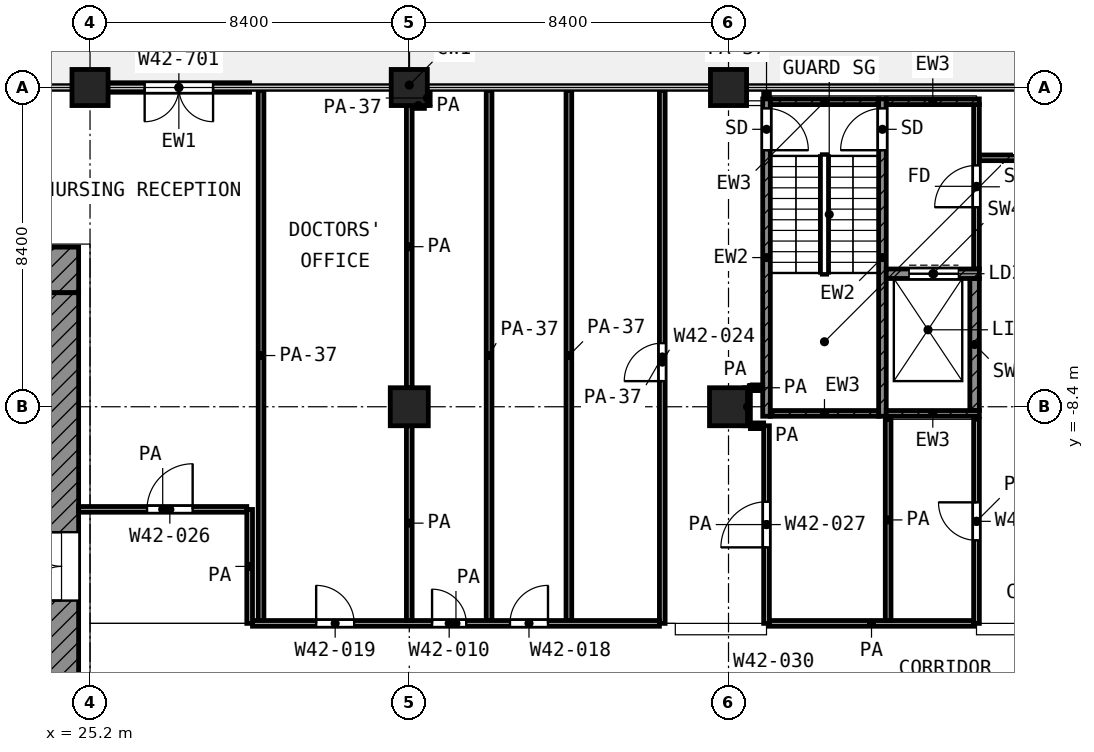
"""IFC4 building model, lengths in metres.
Left out: names, types, materials, properties, quantities, classifications, styles, units other than length and angle.
Written with IfcOpenShell. Run it as: python <this file> out.ifc"""

import sys

from ifc_helpers import new_model, si_unit, direction, frame, frame_2d, origin, origin_2d, place, context, subcontext, project, spatial, rectangle, extrude, element, fill, save


model = new_model("IFC4")
c1 = context("Model", 3, precision=1e-05, world=origin(), true_north=direction((0.0, 1.0)))
c2 = subcontext(c1, "Body", "Model", "MODEL_VIEW")
j1 = project(units=[si_unit("LENGTHUNIT", "METRE"), si_unit("PLANEANGLEUNIT", "RADIAN")], contexts=[c1])
p1 = place(None, origin())
s1 = spatial("IfcSite", under=j1, at=p1, CompositionType="ELEMENT")
p2 = place(p1, origin())
s2 = spatial("IfcBuilding", under=s1, at=p2, CompositionType="ELEMENT")
p3 = place(p2, frame((0.0, 0.0, 204.6)))
s3 = spatial("IfcBuildingStorey", under=s2, at=p3, CompositionType="ELEMENT", Elevation=204.6)
for number, where, z_axis, x_axis in (
    (1, (25.2, 0.0, 0.0), (0.0, 0.0, 1.0), (1.0, 0.0, 0.0)),
    (2, (33.6, 0.0, 0.0), (0.0, 0.0, 1.0), (1.0, 0.0, 0.0)),
    (3, (42.0, 0.0, 0.0), (0.0, 0.0, 1.0), (1.0, 0.0, 0.0)),
):
    element("IfcColumn", number, at=place(p3, frame(where, z_axis=z_axis, x_axis=x_axis)), inside=s3, PredefinedType="COLUMN", context=c2, shape_type="SweptSolid", body=[
        extrude(rectangle(XDim=0.95, YDim=0.95, at=origin_2d()), origin(), (0.0, 0.0, 1.0), 4.2),
    ])
for number, where, z_axis, x_axis in (
    (4, (33.6, -8.4, 0.0), (0.0, 0.0, 1.0), (1.0, 0.0, 0.0)),
    (5, (42.0, -8.4, 0.0), (0.0, 0.0, 1.0), (1.0, 0.0, 0.0)),
):
    element("IfcColumn", number, at=place(p3, frame(where, z_axis=z_axis, x_axis=x_axis)), inside=s3, PredefinedType="COLUMN", context=c2, shape_type="SweptSolid", body=[
        extrude(rectangle(XDim=1.0, YDim=1.0, at=origin_2d()), origin(), (0.0, 0.0, 1.0), 4.2),
    ])
p4 = place(p3, frame((29.4, 0.0, 0.0), z_axis=(0.0, 0.0, 1.0), x_axis=(-1.0, 0.0, 0.0)))
e6 = element("IfcWall", 6, at=p4, inside=s3, PredefinedType="SOLIDWALL", context=c2, shape_type="SweptSolid", body=[
    extrude(rectangle(XDim=3.725, YDim=0.25, at=frame_2d((1.862, 0.0))), origin(), (0.0, 0.0, 1.0), 2.58),
])
p5 = place(p4, frame((0.962, 0.0, 0.0)))
e7 = element("IfcOpeningElement", 7, at=p5, cuts=e6, PredefinedType="OPENING", context=c2, shape_type="SweptSolid", body=[
    extrude(rectangle(XDim=1.8, YDim=2.1, at=frame_2d((0.9, 1.05))), frame((0.0, 0.135, 0.0), z_axis=(0.0, -1.0, 0.0), x_axis=(1.0, 0.0, 0.0)), (0.0, 0.0, 1.0), 0.27),
])
p6 = place(p3, frame((4.2, -4.8, 0.0), z_axis=(0.0, 0.0, 1.0), x_axis=(1.0, 0.0, 0.0)))
e8 = element("IfcWall", 8, at=p6, inside=s3, PredefinedType="SHEAR", context=c2, shape_type="SweptSolid", body=[
    extrude(rectangle(XDim=20.7, YDim=1.2, at=frame_2d((10.35, 0.0))), origin(), (0.0, 0.0, 1.0), 3.6),
])
p7 = place(p6, frame((1.95, 0.0, 0.0)))
e9 = element("IfcOpeningElement", 9, at=p7, cuts=e8, PredefinedType="OPENING", context=c2, shape_type="SweptSolid", body=[
    extrude(rectangle(XDim=1.1, YDim=2.1, at=frame_2d((0.55, 1.05))), frame((0.0, 0.61, 0.0), z_axis=(0.0, -1.0, 0.0), x_axis=(1.0, 0.0, 0.0)), (0.0, 0.0, 1.0), 1.22),
])
p8 = place(p6, frame((17.95, 0.0, 0.0)))
e10 = element("IfcOpeningElement", 10, at=p8, cuts=e8, PredefinedType="OPENING", context=c2, shape_type="SweptSolid", body=[
    extrude(rectangle(XDim=1.1, YDim=2.1, at=frame_2d((0.55, 1.05))), frame((0.0, 0.61, 0.0), z_axis=(0.0, -1.0, 0.0), x_axis=(1.0, 0.0, 0.0)), (0.0, 0.0, 1.0), 1.22),
])
p9 = place(p3, frame((24.45, -24.0, 0.0), z_axis=(0.0, 0.0, 1.0), x_axis=(0.0, 1.0, 0.0)))
e11 = element("IfcWall", 11, at=p9, inside=s3, PredefinedType="SHEAR", context=c2, shape_type="SweptSolid", body=[
    extrude(rectangle(XDim=18.6, YDim=0.9, at=frame_2d((9.3, 0.0))), origin(), (0.0, 0.0, 1.0), 3.6),
])
p10 = place(p9, frame((10.5, 0.0, 0.0)))
e12 = element("IfcOpeningElement", 12, at=p10, cuts=e11, PredefinedType="OPENING", context=c2, shape_type="SweptSolid", body=[
    extrude(rectangle(XDim=1.8, YDim=2.1, at=frame_2d((0.9, 1.05))), frame((0.0, 0.46, 0.0), z_axis=(0.0, -1.0, 0.0), x_axis=(1.0, 0.0, 0.0)), (0.0, 0.0, 1.0), 0.92),
])
p11 = place(p3, frame((43.0, -8.65, 0.0), z_axis=(0.0, 0.0, 1.0), x_axis=(0.0, 1.0, 0.0)))
e13 = element("IfcWall", 13, at=p11, inside=s3, PredefinedType="SHEAR", context=c2, shape_type="SweptSolid", body=[
    extrude(rectangle(XDim=8.35, YDim=0.2, at=frame_2d((4.175, 0.0))), origin(), (0.0, 0.0, 1.0), 3.6),
])
p12 = place(p11, frame((7.0, 0.0, 0.0)))
e14 = element("IfcOpeningElement", 14, at=p12, cuts=e13, PredefinedType="OPENING", context=c2, shape_type="SweptSolid", body=[
    extrude(rectangle(XDim=1.1, YDim=2.1, at=frame_2d((0.55, 1.05))), frame((0.0, 0.11, 0.0), z_axis=(0.0, -1.0, 0.0), x_axis=(1.0, 0.0, 0.0)), (0.0, 0.0, 1.0), 0.22),
])
p13 = place(p3, frame((46.05, -8.65, 0.0), z_axis=(0.0, 0.0, 1.0), x_axis=(0.0, 1.0, 0.0)))
e15 = element("IfcWall", 15, at=p13, inside=s3, PredefinedType="SHEAR", context=c2, shape_type="SweptSolid", body=[
    extrude(rectangle(XDim=8.35, YDim=0.2, at=frame_2d((4.175, 0.0))), origin(), (0.0, 0.0, 1.0), 3.6),
])
p14 = place(p13, frame((7.0, 0.0, 0.0)))
e16 = element("IfcOpeningElement", 16, at=p14, cuts=e15, PredefinedType="OPENING", context=c2, shape_type="SweptSolid", body=[
    extrude(rectangle(XDim=1.1, YDim=2.1, at=frame_2d((0.55, 1.05))), frame((0.0, 0.11, 0.0), z_axis=(0.0, -1.0, 0.0), x_axis=(1.0, 0.0, 0.0)), (0.0, 0.0, 1.0), 0.22),
])
p15 = place(p3, frame((43.1, -0.375, 0.0), z_axis=(0.0, 0.0, 1.0), x_axis=(1.0, 0.0, 0.0)))
e17 = element("IfcWall", 17, at=p15, inside=s3, PredefinedType="SHEAR", context=c2, shape_type="SweptSolid", body=[
    extrude(rectangle(XDim=2.85, YDim=0.15, at=frame_2d((1.425, 0.0))), origin(), (0.0, 0.0, 1.0), 3.6),
])
p16 = place(p3, frame((46.15, -0.375, 0.0), z_axis=(0.0, 0.0, 1.0), x_axis=(1.0, 0.0, 0.0)))
e18 = element("IfcWall", 18, at=p16, inside=s3, PredefinedType="SHEAR", context=c2, shape_type="SweptSolid", body=[
    extrude(rectangle(XDim=2.45, YDim=0.15, at=frame_2d((1.225, 0.0))), origin(), (0.0, 0.0, 1.0), 3.6),
])
p17 = place(p3, frame((43.1, -8.575, 0.0), z_axis=(0.0, 0.0, 1.0), x_axis=(1.0, 0.0, 0.0)))
e19 = element("IfcWall", 19, at=p17, inside=s3, PredefinedType="SHEAR", context=c2, shape_type="SweptSolid", body=[
    extrude(rectangle(XDim=2.85, YDim=0.15, at=frame_2d((1.425, 0.0))), origin(), (0.0, 0.0, 1.0), 3.6),
])
p18 = place(p3, frame((46.15, -8.575, 0.0), z_axis=(0.0, 0.0, 1.0), x_axis=(1.0, 0.0, 0.0)))
e20 = element("IfcWall", 20, at=p18, inside=s3, PredefinedType="SHEAR", context=c2, shape_type="SweptSolid", body=[
    extrude(rectangle(XDim=2.45, YDim=0.15, at=frame_2d((1.225, 0.0))), origin(), (0.0, 0.0, 1.0), 3.6),
])
p19 = place(p3, frame((46.15, -4.9, 0.0), z_axis=(0.0, 0.0, 1.0), x_axis=(1.0, 0.0, 0.0)))
e21 = element("IfcWall", 21, at=p19, inside=s3, PredefinedType="SHEAR", context=c2, shape_type="SweptSolid", body=[
    extrude(rectangle(XDim=2.45, YDim=0.25, at=frame_2d((1.225, 0.0))), origin(), (0.0, 0.0, 1.0), 3.6),
])
p20 = place(p19, frame((0.6, 0.0, 0.0)))
e22 = element("IfcOpeningElement", 22, at=p20, cuts=e21, PredefinedType="OPENING", context=c2, shape_type="SweptSolid", body=[
    extrude(rectangle(XDim=1.3, YDim=2.1, at=frame_2d((0.65, 1.05))), frame((0.0, 0.135, 0.0), z_axis=(0.0, -1.0, 0.0), x_axis=(1.0, 0.0, 0.0)), (0.0, 0.0, 1.0), 0.27),
])
p21 = place(p3, frame((48.475, -8.5, 0.0), z_axis=(0.0, 0.0, 1.0), x_axis=(0.0, 1.0, 0.0)))
e23 = element("IfcWall", 23, at=p21, inside=s3, PredefinedType="SHEAR", context=c2, shape_type="SweptSolid", body=[
    extrude(rectangle(XDim=3.475, YDim=0.25, at=frame_2d((1.738, 0.0))), origin(), (0.0, 0.0, 1.0), 3.6),
])
p22 = place(p3, frame((48.525, -4.775, 0.0), z_axis=(0.0, 0.0, 1.0), x_axis=(0.0, 1.0, 0.0)))
e24 = element("IfcWall", 24, at=p22, inside=s3, PredefinedType="PARTITIONING", context=c2, shape_type="SweptSolid", body=[
    extrude(rectangle(XDim=4.325, YDim=0.15, at=frame_2d((2.163, 0.0))), origin(), (0.0, 0.0, 1.0), 3.6),
])
p23 = place(p22, frame((1.625, 0.0, 0.0)))
e25 = element("IfcOpeningElement", 25, at=p23, cuts=e24, PredefinedType="OPENING", context=c2, shape_type="SweptSolid", body=[
    extrude(rectangle(XDim=1.1, YDim=2.1, at=frame_2d((0.55, 1.05))), frame((0.0, 0.085, 0.0), z_axis=(0.0, -1.0, 0.0), x_axis=(1.0, 0.0, 0.0)), (0.0, 0.0, 1.0), 0.17),
])
p24 = place(p3, frame((29.475, -14.1, 0.0), z_axis=(0.0, 0.0, 1.0), x_axis=(1.0, 0.0, 0.0)))
e26 = element("IfcWall", 26, at=p24, inside=s3, PredefinedType="PARTITIONING", context=c2, shape_type="SweptSolid", body=[
    extrude(rectangle(XDim=10.707, YDim=0.15, at=frame_2d((5.354, 0.0))), origin(), (0.0, 0.0, 1.0), 3.6),
])
p25 = place(p24, frame((1.675, 0.0, 0.0)))
e27 = element("IfcOpeningElement", 27, at=p25, cuts=e26, PredefinedType="OPENING", context=c2, shape_type="SweptSolid", body=[
    extrude(rectangle(XDim=1.0, YDim=2.1, at=frame_2d((0.5, 1.05))), frame((0.0, 0.085, 0.0), z_axis=(0.0, -1.0, 0.0), x_axis=(1.0, 0.0, 0.0)), (0.0, 0.0, 1.0), 0.17),
])
p26 = place(p24, frame((4.725, 0.0, 0.0)))
e28 = element("IfcOpeningElement", 28, at=p26, cuts=e26, PredefinedType="OPENING", context=c2, shape_type="SweptSolid", body=[
    extrude(rectangle(XDim=0.9, YDim=2.1, at=frame_2d((0.45, 1.05))), frame((0.0, 0.085, 0.0), z_axis=(0.0, -1.0, 0.0), x_axis=(1.0, 0.0, 0.0)), (0.0, 0.0, 1.0), 0.17),
])
p27 = place(p24, frame((6.775, 0.0, 0.0)))
e29 = element("IfcOpeningElement", 29, at=p27, cuts=e26, PredefinedType="OPENING", context=c2, shape_type="SweptSolid", body=[
    extrude(rectangle(XDim=1.0, YDim=2.1, at=frame_2d((0.5, 1.05))), frame((0.0, 0.085, 0.0), z_axis=(0.0, -1.0, 0.0), x_axis=(1.0, 0.0, 0.0)), (0.0, 0.0, 1.0), 0.17),
])
p28 = place(p3, frame((43.075, -14.1, 0.0), z_axis=(0.0, 0.0, 1.0), x_axis=(1.0, 0.0, 0.0)))
e30 = element("IfcWall", 30, at=p28, inside=s3, PredefinedType="PARTITIONING", context=c2, shape_type="SweptSolid", body=[
    extrude(rectangle(XDim=5.375, YDim=0.15, at=frame_2d((2.688, 0.0))), origin(), (0.0, 0.0, 1.0), 3.6),
])
p29 = place(p3, frame((24.9, -11.1, 0.0), z_axis=(0.0, 0.0, 1.0), x_axis=(1.0, 0.0, 0.0)))
e31 = element("IfcWall", 31, at=p29, inside=s3, PredefinedType="PARTITIONING", context=c2, shape_type="SweptSolid", body=[
    extrude(rectangle(XDim=4.424, YDim=0.15, at=frame_2d((2.212, 0.0))), origin(), (0.0, 0.0, 1.0), 3.6),
])
p30 = place(p29, frame((1.8, 0.0, 0.0)))
e32 = element("IfcOpeningElement", 32, at=p30, cuts=e31, PredefinedType="OPENING", context=c2, shape_type="SweptSolid", body=[
    extrude(rectangle(XDim=1.2, YDim=2.1, at=frame_2d((0.6, 1.05))), frame((0.0, 0.085, 0.0), z_axis=(0.0, -1.0, 0.0), x_axis=(1.0, 0.0, 0.0)), (0.0, 0.0, 1.0), 0.17),
])
p31 = place(p3, frame((42.577, -8.9, 0.0), z_axis=(0.0, 0.0, 1.0), x_axis=(1.0, 0.0, 0.0)))
e33 = element("IfcWall", 33, at=p31, inside=s3, PredefinedType="PARTITIONING", context=c2, shape_type="SweptSolid", body=[
    extrude(rectangle(XDim=0.348, YDim=0.15, at=frame_2d((0.174, 0.0))), origin(), (0.0, 0.0, 1.0), 3.6),
])
p32 = place(p3, frame((42.577, -7.9, 0.0), z_axis=(0.0, 0.0, 1.0), x_axis=(1.0, 0.0, 0.0)))
e34 = element("IfcWall", 34, at=p32, inside=s3, PredefinedType="PARTITIONING", context=c2, shape_type="SweptSolid", body=[
    extrude(rectangle(XDim=0.323, YDim=0.15, at=frame_2d((0.162, 0.0))), origin(), (0.0, 0.0, 1.0), 3.6),
])
p33 = place(p3, frame((48.6, -1.85, 0.0), z_axis=(0.0, 0.0, 1.0), x_axis=(1.0, 0.0, 0.0)))
e35 = element("IfcWall", 35, at=p33, inside=s3, PredefinedType="PARTITIONING", context=c2, shape_type="SweptSolid", body=[
    extrude(rectangle(XDim=3.466, YDim=0.15, at=frame_2d((1.733, 0.0))), origin(), (0.0, 0.0, 1.0), 3.6),
])
p34 = place(p3, frame((33.677, -0.475, 0.0), z_axis=(0.0, 0.0, 1.0), x_axis=(1.0, 0.0, 0.0)))
e36 = element("IfcWall", 36, at=p34, inside=s3, PredefinedType="PARTITIONING", context=c2, shape_type="SweptSolid", body=[
    extrude(rectangle(XDim=0.321, YDim=0.15, at=frame_2d((0.161, 0.0))), origin(), (0.0, 0.0, 1.0), 3.6),
])
p35 = place(p3, frame((29.4, -14.1, 0.0), z_axis=(0.0, 0.0, 1.0), x_axis=(0.0, 1.0, 0.0)))
e37 = element("IfcWall", 37, at=p35, inside=s3, PredefinedType="PARTITIONING", context=c2, shape_type="SweptSolid", body=[
    extrude(rectangle(XDim=2.998, YDim=0.15, at=frame_2d((1.499, 0.0))), origin(), (0.0, 0.0, 1.0), 3.6),
])
p36 = place(p3, frame((29.7, -14.025, 0.0), z_axis=(0.0, 0.0, 1.0), x_axis=(0.0, 1.0, 0.0)))
e38 = element("IfcWall", 38, at=p36, inside=s3, PredefinedType="PARTITIONING", context=c2, shape_type="SweptSolid", body=[
    extrude(rectangle(XDim=13.945, YDim=0.15, at=frame_2d((6.972, 0.0))), origin(), (0.0, 0.0, 1.0), 2.7),
])
p37 = place(p3, frame((33.6, -14.025, 0.0), z_axis=(0.0, 0.0, 1.0), x_axis=(0.0, 1.0, 0.0)))
e39 = element("IfcWall", 39, at=p37, inside=s3, PredefinedType="PARTITIONING", context=c2, shape_type="SweptSolid", body=[
    extrude(rectangle(XDim=5.125, YDim=0.15, at=frame_2d((2.562, 0.0))), origin(), (0.0, 0.0, 1.0), 3.6),
])
p38 = place(p3, frame((33.6, -7.9, 0.0), z_axis=(0.0, 0.0, 1.0), x_axis=(0.0, 1.0, 0.0)))
e40 = element("IfcWall", 40, at=p38, inside=s3, PredefinedType="PARTITIONING", context=c2, shape_type="SweptSolid", body=[
    extrude(rectangle(XDim=7.423, YDim=0.15, at=frame_2d((3.711, 0.0))), origin(), (0.0, 0.0, 1.0), 3.6),
])
p39 = place(p3, frame((34.075, -0.473, 0.0), z_axis=(0.0, 0.0, 1.0), x_axis=(0.0, 1.0, 0.0)))
e41 = element("IfcWall", 41, at=p39, inside=s3, PredefinedType="PARTITIONING", context=c2, shape_type="SweptSolid", body=[
    extrude(rectangle(XDim=0.393, YDim=0.15, at=frame_2d((0.196, 0.0))), origin(), (0.0, 0.0, 1.0), 2.7),
])
for number, where, z_axis, x_axis in (
    (42, (35.7, -14.025, 0.0), (0.0, 0.0, 1.0), (0.0, 1.0, 0.0)),
    (43, (37.8, -14.025, 0.0), (0.0, 0.0, 1.0), (0.0, 1.0, 0.0)),
):
    element("IfcWall", number, at=place(p3, frame(where, z_axis=z_axis, x_axis=x_axis)), inside=s3, PredefinedType="PARTITIONING", context=c2, shape_type="SweptSolid", body=[
        extrude(rectangle(XDim=13.945, YDim=0.15, at=frame_2d((6.972, 0.0))), origin(), (0.0, 0.0, 1.0), 2.7),
    ])
p40 = place(p3, frame((40.257, -14.1, 0.0), z_axis=(0.0, 0.0, 1.0), x_axis=(0.0, 1.0, 0.0)))
e44 = element("IfcWall", 44, at=p40, inside=s3, PredefinedType="PARTITIONING", context=c2, shape_type="SweptSolid", body=[
    extrude(rectangle(XDim=14.02, YDim=0.15, at=frame_2d((7.01, 0.0))), origin(), (0.0, 0.0, 1.0), 2.7),
])
p41 = place(p40, frame((6.374, 0.0, 0.0)))
e45 = element("IfcOpeningElement", 45, at=p41, cuts=e44, PredefinedType="OPENING", context=c2, shape_type="SweptSolid", body=[
    extrude(rectangle(XDim=1.0, YDim=2.1, at=frame_2d((0.5, 1.05))), frame((0.0, 0.085, 0.0), z_axis=(0.0, -1.0, 0.0), x_axis=(1.0, 0.0, 0.0)), (0.0, 0.0, 1.0), 0.17),
])
p42 = place(p3, frame((42.5, -8.899, 0.0), z_axis=(0.0, 0.0, 1.0), x_axis=(0.0, 1.0, 0.0)))
e46 = element("IfcWall", 46, at=p42, inside=s3, PredefinedType="PARTITIONING", context=c2, shape_type="SweptSolid", body=[
    extrude(rectangle(XDim=0.997, YDim=0.15, at=frame_2d((0.499, 0.0))), origin(), (0.0, 0.0, 1.0), 3.6),
])
p43 = place(p3, frame((43.0, -14.1, 0.0), z_axis=(0.0, 0.0, 1.0), x_axis=(0.0, 1.0, 0.0)))
e47 = element("IfcWall", 47, at=p43, inside=s3, PredefinedType="PARTITIONING", context=c2, shape_type="SweptSolid", body=[
    extrude(rectangle(XDim=5.2, YDim=0.15, at=frame_2d((2.6, 0.0))), origin(), (0.0, 0.0, 1.0), 3.6),
])
p44 = place(p43, frame((2.0, 0.0, 0.0)))
e48 = element("IfcOpeningElement", 48, at=p44, cuts=e47, PredefinedType="OPENING", context=c2, shape_type="SweptSolid", body=[
    extrude(rectangle(XDim=1.2, YDim=2.1, at=frame_2d((0.6, 1.05))), frame((0.0, 0.085, 0.0), z_axis=(0.0, -1.0, 0.0), x_axis=(1.0, 0.0, 0.0)), (0.0, 0.0, 1.0), 0.17),
])
p45 = place(p3, frame((43.0, -0.27, 0.0), z_axis=(0.0, 0.0, 1.0), x_axis=(0.0, 1.0, 0.0)))
e49 = element("IfcWall", 49, at=p45, inside=s3, PredefinedType="PARTITIONING", context=c2, shape_type="SweptSolid", body=[
    extrude(rectangle(XDim=0.19, YDim=0.15, at=frame_2d((0.095, 0.0))), origin(), (0.0, 0.0, 1.0), 2.7),
])
p46 = place(p3, frame((46.2, -14.025, 0.0), z_axis=(0.0, 0.0, 1.0), x_axis=(0.0, 1.0, 0.0)))
e50 = element("IfcWall", 50, at=p46, inside=s3, PredefinedType="PARTITIONING", context=c2, shape_type="SweptSolid", body=[
    extrude(rectangle(XDim=5.295, YDim=0.15, at=frame_2d((2.647, 0.0))), origin(), (0.0, 0.0, 1.0), 3.6),
])
p47 = place(p3, frame((48.525, -14.1, 0.0), z_axis=(0.0, 0.0, 1.0), x_axis=(0.0, 1.0, 0.0)))
e51 = element("IfcWall", 51, at=p47, inside=s3, PredefinedType="PARTITIONING", context=c2, shape_type="SweptSolid", body=[
    extrude(rectangle(XDim=5.37, YDim=0.15, at=frame_2d((2.685, 0.0))), origin(), (0.0, 0.0, 1.0), 3.6),
])
p48 = place(p47, frame((2.185, 0.0, 0.0)))
e52 = element("IfcOpeningElement", 52, at=p48, cuts=e51, PredefinedType="OPENING", context=c2, shape_type="SweptSolid", body=[
    extrude(rectangle(XDim=1.0, YDim=2.1, at=frame_2d((0.5, 1.05))), frame((0.0, 0.085, 0.0), z_axis=(0.0, -1.0, 0.0), x_axis=(1.0, 0.0, 0.0)), (0.0, 0.0, 1.0), 0.17),
])
p49 = place(p5, origin())
e53 = element("IfcDoor", 53, at=p49, inside=s3, OperationType="DOUBLE_DOOR_SINGLE_SWING", PredefinedType="DOOR", context=c2, shape_type="SweptSolid", body=[
    extrude(rectangle(XDim=1.8, YDim=2.1, at=frame_2d((0.9, 1.05))), frame((0.0, 0.025, 0.0), z_axis=(0.0, -1.0, 0.0), x_axis=(1.0, 0.0, 0.0)), (0.0, 0.0, 1.0), 0.05),
])
fill(e7, e53)
p50 = place(p10, origin())
e54 = element("IfcDoor", 54, at=p50, inside=s3, OperationType="DOUBLE_DOOR_SINGLE_SWING", PredefinedType="DOOR", context=c2, shape_type="SweptSolid", body=[
    extrude(rectangle(XDim=1.8, YDim=2.1, at=frame_2d((0.9, 1.05))), frame((0.0, 0.025, 0.0), z_axis=(0.0, -1.0, 0.0), x_axis=(1.0, 0.0, 0.0)), (0.0, 0.0, 1.0), 0.05),
])
fill(e12, e54)
p51 = place(p12, frame((1.1, 0.0, 0.0), z_axis=(0.0, 0.0, 1.0), x_axis=(-1.0, 0.0, 0.0)))
e55 = element("IfcDoor", 55, at=p51, inside=s3, OperationType="SINGLE_SWING_LEFT", PredefinedType="DOOR", context=c2, shape_type="SweptSolid", body=[
    extrude(rectangle(XDim=1.1, YDim=2.1, at=frame_2d((0.55, 1.05))), frame((0.0, 0.025, 0.0), z_axis=(0.0, -1.0, 0.0), x_axis=(1.0, 0.0, 0.0)), (0.0, 0.0, 1.0), 0.05),
])
fill(e14, e55)
p52 = place(p14, origin())
e56 = element("IfcDoor", 56, at=p52, inside=s3, OperationType="SINGLE_SWING_LEFT", PredefinedType="DOOR", context=c2, shape_type="SweptSolid", body=[
    extrude(rectangle(XDim=1.1, YDim=2.1, at=frame_2d((0.55, 1.05))), frame((0.0, 0.025, 0.0), z_axis=(0.0, -1.0, 0.0), x_axis=(1.0, 0.0, 0.0)), (0.0, 0.0, 1.0), 0.05),
])
fill(e16, e56)
p53 = place(p20, origin())
e57 = element("IfcDoor", 57, at=p53, inside=s3, OperationType="DOUBLE_DOOR_SLIDING", PredefinedType="DOOR", context=c2, shape_type="SweptSolid", body=[
    extrude(rectangle(XDim=1.3, YDim=2.1, at=frame_2d((0.65, 1.05))), frame((0.0, 0.025, 0.0), z_axis=(0.0, -1.0, 0.0), x_axis=(1.0, 0.0, 0.0)), (0.0, 0.0, 1.0), 0.05),
])
fill(e22, e57)
p54 = place(p23, origin())
e58 = element("IfcDoor", 58, at=p54, inside=s3, OperationType="SINGLE_SWING_LEFT", PredefinedType="DOOR", context=c2, shape_type="SweptSolid", body=[
    extrude(rectangle(XDim=1.1, YDim=2.1, at=frame_2d((0.55, 1.05))), frame((0.0, 0.025, 0.0), z_axis=(0.0, -1.0, 0.0), x_axis=(1.0, 0.0, 0.0)), (0.0, 0.0, 1.0), 0.05),
])
fill(e25, e58)
p55 = place(p30, origin())
e59 = element("IfcDoor", 59, at=p55, inside=s3, OperationType="SINGLE_SWING_RIGHT", PredefinedType="DOOR", context=c2, shape_type="SweptSolid", body=[
    extrude(rectangle(XDim=1.2, YDim=2.1, at=frame_2d((0.6, 1.05))), frame((0.0, 0.025, 0.0), z_axis=(0.0, -1.0, 0.0), x_axis=(1.0, 0.0, 0.0)), (0.0, 0.0, 1.0), 0.05),
])
fill(e32, e59)
p56 = place(p25, origin())
e60 = element("IfcDoor", 60, at=p56, inside=s3, OperationType="SINGLE_SWING_LEFT", PredefinedType="DOOR", context=c2, shape_type="SweptSolid", body=[
    extrude(rectangle(XDim=1.0, YDim=2.1, at=frame_2d((0.5, 1.05))), frame((0.0, 0.025, 0.0), z_axis=(0.0, -1.0, 0.0), x_axis=(1.0, 0.0, 0.0)), (0.0, 0.0, 1.0), 0.05),
])
fill(e27, e60)
p57 = place(p44, origin())
e61 = element("IfcDoor", 61, at=p57, inside=s3, OperationType="SINGLE_SWING_LEFT", PredefinedType="DOOR", context=c2, shape_type="SweptSolid", body=[
    extrude(rectangle(XDim=1.2, YDim=2.1, at=frame_2d((0.6, 1.05))), frame((0.0, 0.025, 0.0), z_axis=(0.0, -1.0, 0.0), x_axis=(1.0, 0.0, 0.0)), (0.0, 0.0, 1.0), 0.05),
])
fill(e48, e61)
p58 = place(p26, origin())
e62 = element("IfcDoor", 62, at=p58, inside=s3, OperationType="SINGLE_SWING_LEFT", PredefinedType="DOOR", context=c2, shape_type="SweptSolid", body=[
    extrude(rectangle(XDim=0.9, YDim=2.1, at=frame_2d((0.45, 1.05))), frame((0.0, 0.025, 0.0), z_axis=(0.0, -1.0, 0.0), x_axis=(1.0, 0.0, 0.0)), (0.0, 0.0, 1.0), 0.05),
])
fill(e28, e62)
p59 = place(p27, origin())
e63 = element("IfcDoor", 63, at=p59, inside=s3, OperationType="SINGLE_SWING_RIGHT", PredefinedType="DOOR", context=c2, shape_type="SweptSolid", body=[
    extrude(rectangle(XDim=1.0, YDim=2.1, at=frame_2d((0.5, 1.05))), frame((0.0, 0.025, 0.0), z_axis=(0.0, -1.0, 0.0), x_axis=(1.0, 0.0, 0.0)), (0.0, 0.0, 1.0), 0.05),
])
fill(e29, e63)
p60 = place(p41, origin())
e64 = element("IfcDoor", 64, at=p60, inside=s3, OperationType="SINGLE_SWING_LEFT", PredefinedType="DOOR", context=c2, shape_type="SweptSolid", body=[
    extrude(rectangle(XDim=1.0, YDim=2.1, at=frame_2d((0.5, 1.05))), frame((0.0, 0.025, 0.0), z_axis=(0.0, -1.0, 0.0), x_axis=(1.0, 0.0, 0.0)), (0.0, 0.0, 1.0), 0.05),
])
fill(e45, e64)
p61 = place(p48, origin())
e65 = element("IfcDoor", 65, at=p61, inside=s3, OperationType="SINGLE_SWING_RIGHT", PredefinedType="DOOR", context=c2, shape_type="SweptSolid", body=[
    extrude(rectangle(XDim=1.0, YDim=2.1, at=frame_2d((0.5, 1.05))), frame((0.0, 0.025, 0.0), z_axis=(0.0, -1.0, 0.0), x_axis=(1.0, 0.0, 0.0)), (0.0, 0.0, 1.0), 0.05),
])
fill(e52, e65)
save(model, sys.argv[1])
